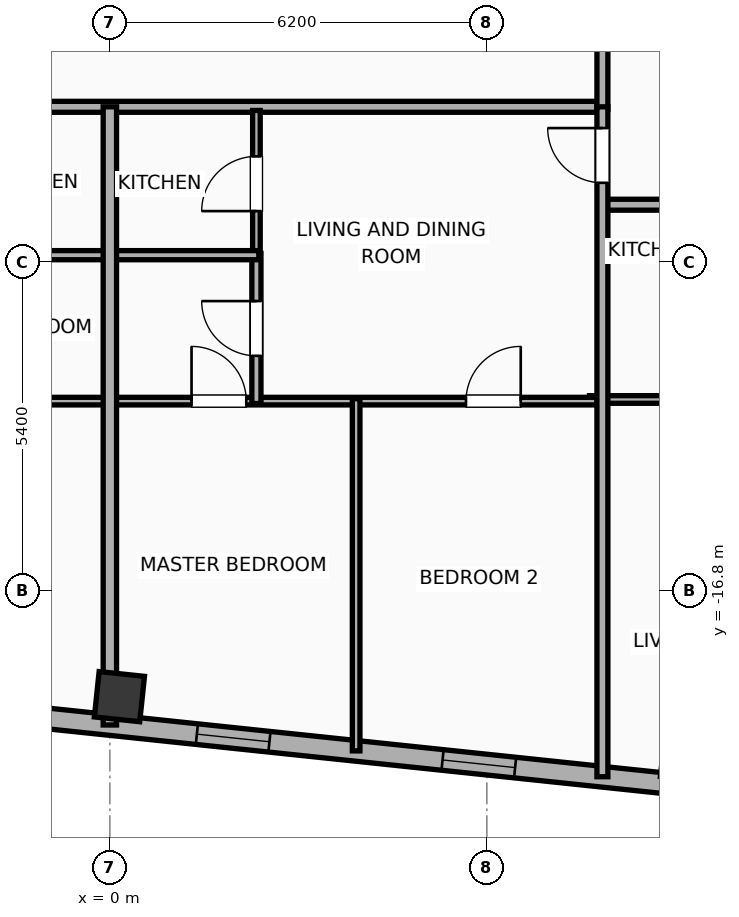
"""IFC4 building model, lengths in metres.
Left out: names, types, materials, properties, quantities, classifications, styles, units other than length and angle.
Written with IfcOpenShell. Run it as: python <this file> out.ifc"""

import sys

from ifc_helpers import new_model, si_unit, direction, frame, frame_2d, origin, origin_2d, place, context, subcontext, project, spatial, rectangle, hollow_rectangle, extrude, element, fill, save


model = new_model("IFC4")
c1 = context("Model", 3, precision=1e-05, world=origin(), true_north=direction((0.0, 1.0)))
c2 = subcontext(c1, "Body", "Model", "MODEL_VIEW")
j1 = project(units=[si_unit("LENGTHUNIT", "METRE"), si_unit("PLANEANGLEUNIT", "RADIAN")], contexts=[c1])
p1 = place(None, origin())
s1 = spatial("IfcSite", under=j1, at=p1, CompositionType="ELEMENT")
p2 = place(p1, origin())
s2 = spatial("IfcBuilding", under=s1, at=p2, CompositionType="ELEMENT")
p3 = place(p2, frame((0.0, 0.0, 263.9)))
s3 = spatial("IfcBuildingStorey", under=s2, at=p3, CompositionType="ELEMENT", Elevation=263.9)
p4 = place(p3, frame((0.157, -18.54, 0.0), z_axis=(0.0, 0.0, 1.0), x_axis=(0.994521895368, -0.104528463268, 0.0)))
e1 = element("IfcColumn", 1, at=p4, inside=s3, PredefinedType="COLUMN", context=c2, shape_type="SweptSolid", body=[
    extrude(hollow_rectangle(XDim=0.75, YDim=0.75, WallThickness=0.025, at=origin_2d()), origin(), (0.0, 0.0, 1.0), 3.9),
])
p5 = place(p3, frame((18.708, -20.972, 0.0), z_axis=(0.0, 0.0, 1.0), x_axis=(-0.994521888554, 0.104528528102, 0.0)))
e2 = element("IfcWall", 2, at=p5, inside=s3, PredefinedType="ELEMENTEDWALL", context=c2, shape_type="SweptSolid", body=[
    extrude(rectangle(XDim=46.766, YDim=0.34, at=frame_2d((23.383, 0.0))), origin(), (0.0, 0.0, 1.0), 3.65),
])
p6 = place(p5, frame((23.833, 0.0, 0.75)))
e3 = element("IfcOpeningElement", 3, at=p6, cuts=e2, PredefinedType="OPENING", context=c2, shape_type="SweptSolid", body=[
    extrude(rectangle(XDim=2.4, YDim=2.1, at=frame_2d((1.2, 1.05))), frame((0.0, 0.18, 0.0), z_axis=(0.0, -1.0, 0.0), x_axis=(1.0, 0.0, 0.0)), (0.0, 0.0, 1.0), 0.36),
])
p7 = place(p5, frame((38.622, 0.0, 0.75)))
e4 = element("IfcOpeningElement", 4, at=p7, cuts=e2, PredefinedType="OPENING", context=c2, shape_type="SweptSolid", body=[
    extrude(rectangle(XDim=2.4, YDim=2.1, at=frame_2d((1.2, 1.05))), frame((0.0, 0.18, 0.0), z_axis=(0.0, -1.0, 0.0), x_axis=(1.0, 0.0, 0.0)), (0.0, 0.0, 1.0), 0.36),
])
p8 = place(p5, frame((44.402, 0.0, 0.75)))
e5 = element("IfcOpeningElement", 5, at=p8, cuts=e2, PredefinedType="OPENING", context=c2, shape_type="SweptSolid", body=[
    extrude(rectangle(XDim=1.2, YDim=2.05, at=frame_2d((0.6, 1.025))), frame((0.0, 0.18, 0.0), z_axis=(0.0, -1.0, 0.0), x_axis=(1.0, 0.0, 0.0)), (0.0, 0.0, 1.0), 0.36),
])
p9 = place(p5, frame((42.406, 0.0, 0.75)))
e6 = element("IfcOpeningElement", 6, at=p9, cuts=e2, PredefinedType="OPENING", context=c2, shape_type="SweptSolid", body=[
    extrude(rectangle(XDim=1.2, YDim=2.05, at=frame_2d((0.6, 1.025))), frame((0.0, 0.18, 0.0), z_axis=(0.0, -1.0, 0.0), x_axis=(1.0, 0.0, 0.0)), (0.0, 0.0, 1.0), 0.36),
])
p10 = place(p5, frame((34.933, 0.0, 0.75)))
e7 = element("IfcOpeningElement", 7, at=p10, cuts=e2, PredefinedType="OPENING", context=c2, shape_type="SweptSolid", body=[
    extrude(rectangle(XDim=1.2, YDim=2.05, at=frame_2d((0.6, 1.025))), frame((0.0, 0.18, 0.0), z_axis=(0.0, -1.0, 0.0), x_axis=(1.0, 0.0, 0.0)), (0.0, 0.0, 1.0), 0.36),
])
p11 = place(p5, frame((28.631, 0.0, 0.75)))
e8 = element("IfcOpeningElement", 8, at=p11, cuts=e2, PredefinedType="OPENING", context=c2, shape_type="SweptSolid", body=[
    extrude(rectangle(XDim=1.2, YDim=2.05, at=frame_2d((0.6, 1.025))), frame((0.0, 0.18, 0.0), z_axis=(0.0, -1.0, 0.0), x_axis=(1.0, 0.0, 0.0)), (0.0, 0.0, 1.0), 0.36),
])
p12 = place(p5, frame((30.896, 0.0, 0.75)))
e9 = element("IfcOpeningElement", 9, at=p12, cuts=e2, PredefinedType="OPENING", context=c2, shape_type="SweptSolid", body=[
    extrude(rectangle(XDim=1.2, YDim=2.05, at=frame_2d((0.6, 1.025))), frame((0.0, 0.18, 0.0), z_axis=(0.0, -1.0, 0.0), x_axis=(1.0, 0.0, 0.0)), (0.0, 0.0, 1.0), 0.36),
])
p13 = place(p5, frame((7.501, 0.0, 0.75)))
e10 = element("IfcOpeningElement", 10, at=p13, cuts=e2, PredefinedType="OPENING", context=c2, shape_type="SweptSolid", body=[
    extrude(rectangle(XDim=1.2, YDim=2.05, at=frame_2d((0.6, 1.025))), frame((0.0, 0.18, 0.0), z_axis=(0.0, -1.0, 0.0), x_axis=(1.0, 0.0, 0.0)), (0.0, 0.0, 1.0), 0.36),
])
p14 = place(p5, frame((4.159, 0.0, 0.75)))
e11 = element("IfcOpeningElement", 11, at=p14, cuts=e2, PredefinedType="OPENING", context=c2, shape_type="SweptSolid", body=[
    extrude(rectangle(XDim=1.2, YDim=2.05, at=frame_2d((0.6, 1.025))), frame((0.0, 0.18, 0.0), z_axis=(0.0, -1.0, 0.0), x_axis=(1.0, 0.0, 0.0)), (0.0, 0.0, 1.0), 0.36),
])
p15 = place(p5, frame((1.369, 0.0, 0.75)))
e12 = element("IfcOpeningElement", 12, at=p15, cuts=e2, PredefinedType="OPENING", context=c2, shape_type="SweptSolid", body=[
    extrude(rectangle(XDim=1.2, YDim=2.05, at=frame_2d((0.6, 1.025))), frame((0.0, 0.18, 0.0), z_axis=(0.0, -1.0, 0.0), x_axis=(1.0, 0.0, 0.0)), (0.0, 0.0, 1.0), 0.36),
])
p16 = place(p5, frame((20.254, 0.0, 0.75)))
e13 = element("IfcOpeningElement", 13, at=p16, cuts=e2, PredefinedType="OPENING", context=c2, shape_type="SweptSolid", body=[
    extrude(rectangle(XDim=1.2, YDim=2.05, at=frame_2d((0.6, 1.025))), frame((0.0, 0.18, 0.0), z_axis=(0.0, -1.0, 0.0), x_axis=(1.0, 0.0, 0.0)), (0.0, 0.0, 1.0), 0.36),
])
p17 = place(p5, frame((16.172, 0.0, 0.75)))
e14 = element("IfcOpeningElement", 14, at=p17, cuts=e2, PredefinedType="OPENING", context=c2, shape_type="SweptSolid", body=[
    extrude(rectangle(XDim=1.2, YDim=2.05, at=frame_2d((0.6, 1.025))), frame((0.0, 0.18, 0.0), z_axis=(0.0, -1.0, 0.0), x_axis=(1.0, 0.0, 0.0)), (0.0, 0.0, 1.0), 0.36),
])
p18 = place(p5, frame((12.11, 0.0, 0.75)))
e15 = element("IfcOpeningElement", 15, at=p18, cuts=e2, PredefinedType="OPENING", context=c2, shape_type="SweptSolid", body=[
    extrude(rectangle(XDim=1.2, YDim=2.05, at=frame_2d((0.6, 1.025))), frame((0.0, 0.18, 0.0), z_axis=(0.0, -1.0, 0.0), x_axis=(1.0, 0.0, 0.0)), (0.0, 0.0, 1.0), 0.36),
])
p19 = place(p3, frame((-8.15, -8.84, 0.0), z_axis=(0.0, 0.0, 1.0), x_axis=(1.0, 0.0, 0.0)))
e16 = element("IfcWall", 16, at=p19, inside=s3, PredefinedType="PARTITIONING", context=c2, shape_type="SweptSolid", body=[
    extrude(rectangle(XDim=16.3, YDim=0.18, at=frame_2d((8.15, 0.0))), origin(), (0.0, 0.0, 1.0), 3.65),
])
p20 = place(p3, frame((8.1, -8.88, 0.0), z_axis=(0.0, 0.0, 1.0), x_axis=(0.0, 1.0, 0.0)))
e17 = element("IfcWall", 17, at=p20, inside=s3, PredefinedType="PARTITIONING", context=c2, shape_type="SweptSolid", body=[
    extrude(rectangle(XDim=17.76, YDim=0.18, at=frame_2d((8.88, 0.0))), origin(), (0.0, 0.0, 1.0), 3.65),
])
p21 = place(p3, frame((7.887, -13.653, 0.0), z_axis=(0.0, 0.0, 1.0), x_axis=(1.0, 0.0, 0.0)))
e18 = element("IfcWall", 18, at=p21, inside=s3, PredefinedType="PARTITIONING", context=c2, shape_type="SweptSolid", body=[
    extrude(rectangle(XDim=2.623, YDim=0.125, at=frame_2d((1.311, 0.0))), origin(), (0.0, 0.0, 1.0), 3.65),
])
p22 = place(p3, frame((8.08, -10.45, 0.0), z_axis=(0.0, 0.0, 1.0), x_axis=(1.0, 0.0, 0.0)))
e19 = element("IfcWall", 19, at=p22, inside=s3, PredefinedType="PARTITIONING", context=c2, shape_type="SweptSolid", body=[
    extrude(rectangle(XDim=15.199, YDim=0.18, at=frame_2d((7.6, 0.0))), origin(), (0.0, 0.0, 1.0), 3.65),
])
p23 = place(p22, frame((3.39, 0.0, 0.0)))
e20 = element("IfcOpeningElement", 20, at=p23, cuts=e19, PredefinedType="OPENING", context=c2, shape_type="SweptSolid", body=[
    extrude(rectangle(XDim=1.15, YDim=2.05, at=frame_2d((0.575, 1.025))), frame((0.0, 0.1, 0.0), z_axis=(0.0, -1.0, 0.0), x_axis=(1.0, 0.0, 0.0)), (0.0, 0.0, 1.0), 0.2),
])
p24 = place(p22, frame((11.134, 0.0, 0.0)))
e21 = element("IfcOpeningElement", 21, at=p24, cuts=e19, PredefinedType="OPENING", context=c2, shape_type="SweptSolid", body=[
    extrude(rectangle(XDim=0.9, YDim=2.05, at=frame_2d((0.45, 1.025))), frame((0.0, 0.1, 0.0), z_axis=(0.0, -1.0, 0.0), x_axis=(1.0, 0.0, 0.0)), (0.0, 0.0, 1.0), 0.2),
])
p25 = place(p3, frame((-8.08, -13.68, 0.0), z_axis=(0.0, 0.0, 1.0), x_axis=(1.0, 0.0, 0.0)))
e22 = element("IfcWall", 22, at=p25, inside=s3, PredefinedType="PARTITIONING", context=c2, shape_type="SweptSolid", body=[
    extrude(rectangle(XDim=8.06, YDim=0.125, at=frame_2d((4.03, 0.0))), origin(), (0.0, 0.0, 1.0), 3.65),
])
p26 = place(p25, frame((1.323, 0.0, 0.0)))
e23 = element("IfcOpeningElement", 23, at=p26, cuts=e22, PredefinedType="OPENING", context=c2, shape_type="SweptSolid", body=[
    extrude(rectangle(XDim=0.9, YDim=2.05, at=frame_2d((0.45, 1.025))), frame((0.0, 0.073, 0.0), z_axis=(0.0, -1.0, 0.0), x_axis=(1.0, 0.0, 0.0)), (0.0, 0.0, 1.0), 0.145),
])
p27 = place(p25, frame((4.547, 0.0, 0.0)))
e24 = element("IfcOpeningElement", 24, at=p27, cuts=e22, PredefinedType="OPENING", context=c2, shape_type="SweptSolid", body=[
    extrude(rectangle(XDim=0.9, YDim=2.05, at=frame_2d((0.45, 1.025))), frame((0.0, 0.073, 0.0), z_axis=(0.0, -1.0, 0.0), x_axis=(1.0, 0.0, 0.0)), (0.0, 0.0, 1.0), 0.145),
])
p28 = place(p3, frame((-2.45, -11.28, 0.0), z_axis=(0.0, 0.0, 1.0), x_axis=(1.0, 0.0, 0.0)))
e25 = element("IfcWall", 25, at=p28, inside=s3, PredefinedType="PLUMBINGWALL", context=c2, shape_type="SweptSolid", body=[
    extrude(rectangle(XDim=2.43, YDim=0.15, at=frame_2d((1.215, 0.0))), origin(), (0.0, 0.0, 1.0), 3.65),
])
p29 = place(p3, frame((0.02, -13.68, 0.0), z_axis=(0.0, 0.0, 1.0), x_axis=(1.0, 0.0, 0.0)))
e26 = element("IfcWall", 26, at=p29, inside=s3, PredefinedType="PARTITIONING", context=c2, shape_type="SweptSolid", body=[
    extrude(rectangle(XDim=7.992, YDim=0.125, at=frame_2d((3.996, 0.0))), origin(), (0.0, 0.0, 1.0), 3.65),
])
p30 = place(p29, frame((1.323, 0.0, 0.0)))
e27 = element("IfcOpeningElement", 27, at=p30, cuts=e26, PredefinedType="OPENING", context=c2, shape_type="SweptSolid", body=[
    extrude(rectangle(XDim=0.9, YDim=2.05, at=frame_2d((0.45, 1.025))), frame((0.0, 0.073, 0.0), z_axis=(0.0, -1.0, 0.0), x_axis=(1.0, 0.0, 0.0)), (0.0, 0.0, 1.0), 0.145),
])
p31 = place(p29, frame((5.837, 0.0, 0.0)))
e28 = element("IfcOpeningElement", 28, at=p31, cuts=e26, PredefinedType="OPENING", context=c2, shape_type="SweptSolid", body=[
    extrude(rectangle(XDim=0.9, YDim=2.05, at=frame_2d((0.45, 1.025))), frame((0.0, 0.073, 0.0), z_axis=(0.0, -1.0, 0.0), x_axis=(1.0, 0.0, 0.0)), (0.0, 0.0, 1.0), 0.145),
])
p32 = place(p3, frame((2.41, -11.31, 0.0), z_axis=(0.0, 0.0, 1.0), x_axis=(0.0, 1.0, 0.0)))
e29 = element("IfcWall", 29, at=p32, inside=s3, PredefinedType="PARTITIONING", context=c2, shape_type="SweptSolid", body=[
    extrude(rectangle(XDim=2.41, YDim=0.125, at=frame_2d((1.205, 0.0))), origin(), (0.0, 0.0, 1.0), 3.65),
])
p33 = place(p32, frame((0.755, 0.0, 0.0)))
e30 = element("IfcOpeningElement", 30, at=p33, cuts=e29, PredefinedType="OPENING", context=c2, shape_type="SweptSolid", body=[
    extrude(rectangle(XDim=0.9, YDim=2.05, at=frame_2d((0.45, 1.025))), frame((0.0, 0.073, 0.0), z_axis=(0.0, -1.0, 0.0), x_axis=(1.0, 0.0, 0.0)), (0.0, 0.0, 1.0), 0.145),
])
p34 = place(p3, frame((2.41, -13.72, 0.0), z_axis=(0.0, 0.0, 1.0), x_axis=(0.0, 1.0, 0.0)))
e31 = element("IfcWall", 31, at=p34, inside=s3, PredefinedType="PLUMBINGWALL", context=c2, shape_type="SweptSolid", body=[
    extrude(rectangle(XDim=2.47, YDim=0.15, at=frame_2d((1.235, 0.0))), origin(), (0.0, 0.0, 1.0), 3.09),
])
p35 = place(p34, frame((0.785, 0.0, 0.0)))
e32 = element("IfcOpeningElement", 32, at=p35, cuts=e31, PredefinedType="OPENING", context=c2, shape_type="SweptSolid", body=[
    extrude(rectangle(XDim=0.9, YDim=2.05, at=frame_2d((0.45, 1.025))), frame((0.0, 0.085, 0.0), z_axis=(0.0, -1.0, 0.0), x_axis=(1.0, 0.0, 0.0)), (0.0, 0.0, 1.0), 0.17),
])
p36 = place(p3, frame((0.02, -11.28, 0.0), z_axis=(0.0, 0.0, 1.0), x_axis=(1.0, 0.0, 0.0)))
e33 = element("IfcWall", 33, at=p36, inside=s3, PredefinedType="PLUMBINGWALL", context=c2, shape_type="SweptSolid", body=[
    extrude(rectangle(XDim=2.43, YDim=0.15, at=frame_2d((1.215, 0.0))), origin(), (0.0, 0.0, 1.0), 3.65),
])
p37 = place(p3, frame((4.05, -19.432, 0.0), z_axis=(0.0, 0.0, 1.0), x_axis=(0.0, 1.0, 0.0)))
e34 = element("IfcWall", 34, at=p37, inside=s3, PredefinedType="PARTITIONING", context=c2, shape_type="SweptSolid", body=[
    extrude(rectangle(XDim=5.792, YDim=0.125, at=frame_2d((2.896, 0.0))), origin(), (0.0, 0.0, 1.0), 3.65),
])
p38 = place(p3, frame((8.1, -19.857, 0.0), z_axis=(0.0, 0.0, 1.0), x_axis=(0.0, 1.0, 0.0)))
e35 = element("IfcWall", 35, at=p38, inside=s3, PredefinedType="PARTITIONING", context=c2, shape_type="SweptSolid", body=[
    extrude(rectangle(XDim=11.017, YDim=0.18, at=frame_2d((5.509, 0.0))), origin(), (0.0, 0.0, 1.0), 3.65),
])
p39 = place(p38, frame((9.767, 0.0, 0.0)))
e36 = element("IfcOpeningElement", 36, at=p39, cuts=e35, PredefinedType="OPENING", context=c2, shape_type="SweptSolid", body=[
    extrude(rectangle(XDim=0.9, YDim=2.05, at=frame_2d((0.45, 1.025))), frame((0.0, 0.1, 0.0), z_axis=(0.0, -1.0, 0.0), x_axis=(1.0, 0.0, 0.0)), (0.0, 0.0, 1.0), 0.2),
])
p40 = place(p3, frame((0.0, -19.006, 0.0), z_axis=(0.0, 0.0, 1.0), x_axis=(0.0, 1.0, 0.0)))
e37 = element("IfcWall", 37, at=p40, inside=s3, PredefinedType="PARTITIONING", context=c2, shape_type="SweptSolid", body=[
    extrude(rectangle(XDim=10.166, YDim=0.22, at=frame_2d((5.083, 0.0))), origin(), (0.0, 0.0, 1.0), 3.65),
])
p41 = place(p17, origin())
e38 = element("IfcWindow", 38, at=p41, inside=s3, PartitioningType="SINGLE_PANEL", PredefinedType="WINDOW", context=c2, shape_type="SweptSolid", body=[
    extrude(rectangle(XDim=1.2, YDim=2.05, at=frame_2d((0.6, 1.025))), frame((0.0, 0.03, 0.0), z_axis=(0.0, -1.0, 0.0), x_axis=(1.0, 0.0, 0.0)), (0.0, 0.0, 1.0), 0.06),
])
fill(e14, e38)
p42 = place(p18, origin())
e39 = element("IfcWindow", 39, at=p42, inside=s3, PartitioningType="SINGLE_PANEL", PredefinedType="WINDOW", context=c2, shape_type="SweptSolid", body=[
    extrude(rectangle(XDim=1.2, YDim=2.05, at=frame_2d((0.6, 1.025))), frame((0.0, 0.03, 0.0), z_axis=(0.0, -1.0, 0.0), x_axis=(1.0, 0.0, 0.0)), (0.0, 0.0, 1.0), 0.06),
])
fill(e15, e39)
p43 = place(p30, origin())
e40 = element("IfcDoor", 40, at=p43, inside=s3, OperationType="SINGLE_SWING_LEFT", PredefinedType="DOOR", context=c2, shape_type="SweptSolid", body=[
    extrude(rectangle(XDim=0.9, YDim=2.05, at=frame_2d((0.45, 1.025))), frame((0.0, 0.025, 0.0), z_axis=(0.0, -1.0, 0.0), x_axis=(1.0, 0.0, 0.0)), (0.0, 0.0, 1.0), 0.05),
])
fill(e27, e40)
p44 = place(p31, origin())
e41 = element("IfcDoor", 41, at=p44, inside=s3, OperationType="SINGLE_SWING_RIGHT", PredefinedType="DOOR", context=c2, shape_type="SweptSolid", body=[
    extrude(rectangle(XDim=0.9, YDim=2.05, at=frame_2d((0.45, 1.025))), frame((0.0, 0.025, 0.0), z_axis=(0.0, -1.0, 0.0), x_axis=(1.0, 0.0, 0.0)), (0.0, 0.0, 1.0), 0.05),
])
fill(e28, e41)
p45 = place(p33, origin())
e42 = element("IfcDoor", 42, at=p45, inside=s3, OperationType="SINGLE_SWING_LEFT", PredefinedType="DOOR", context=c2, shape_type="SweptSolid", body=[
    extrude(rectangle(XDim=0.9, YDim=2.05, at=frame_2d((0.45, 1.025))), frame((0.0, 0.025, 0.0), z_axis=(0.0, -1.0, 0.0), x_axis=(1.0, 0.0, 0.0)), (0.0, 0.0, 1.0), 0.05),
])
fill(e30, e42)
p46 = place(p35, origin())
e43 = element("IfcDoor", 43, at=p46, inside=s3, OperationType="SINGLE_SWING_RIGHT", PredefinedType="DOOR", context=c2, shape_type="SweptSolid", body=[
    extrude(rectangle(XDim=0.9, YDim=2.05, at=frame_2d((0.45, 1.025))), frame((0.0, 0.025, 0.0), z_axis=(0.0, -1.0, 0.0), x_axis=(1.0, 0.0, 0.0)), (0.0, 0.0, 1.0), 0.05),
])
fill(e32, e43)
p47 = place(p39, origin())
e44 = element("IfcDoor", 44, at=p47, inside=s3, OperationType="SINGLE_SWING_RIGHT", PredefinedType="DOOR", context=c2, shape_type="SweptSolid", body=[
    extrude(rectangle(XDim=0.9, YDim=2.05, at=frame_2d((0.45, 1.025))), frame((0.0, 0.025, 0.0), z_axis=(0.0, -1.0, 0.0), x_axis=(1.0, 0.0, 0.0)), (0.0, 0.0, 1.0), 0.05),
])
fill(e36, e44)
save(model, sys.argv[1])
